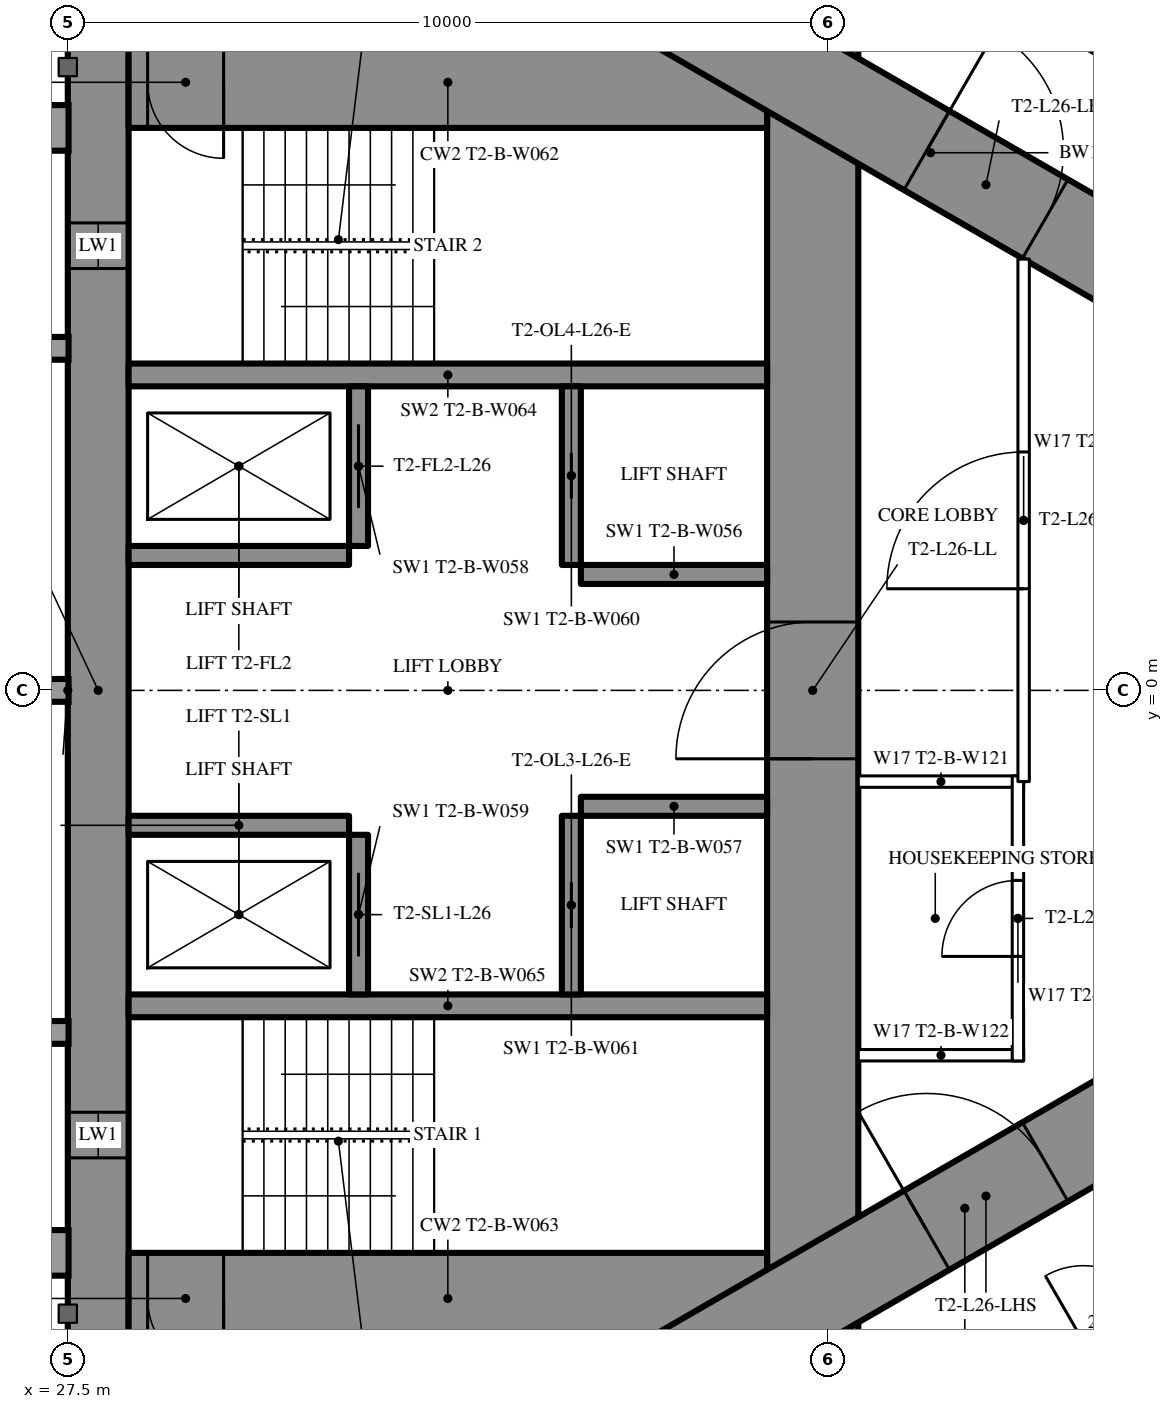
"""IFC4 building model, lengths in metres.
Left out: names, types, materials, properties, quantities, classifications, styles, units other than length and angle.
Written with IfcOpenShell. Run it as: python <this file> out.ifc"""

import sys

from ifc_helpers import new_model, si_unit, direction, frame, frame_2d, origin, place, context, subcontext, project, spatial, rectangle, extrude, element, fill, save


model = new_model("IFC4")
c1 = context("Model", 3, precision=1e-05, world=origin(), true_north=direction((0.0, 1.0)))
c2 = subcontext(c1, "Body", "Model", "MODEL_VIEW")
j1 = project(units=[si_unit("LENGTHUNIT", "METRE"), si_unit("PLANEANGLEUNIT", "RADIAN")], contexts=[c1])
p1 = place(None, origin())
s1 = spatial("IfcSite", under=j1, at=p1, CompositionType="ELEMENT")
p2 = place(p1, origin())
s2 = spatial("IfcBuilding", under=s1, at=p2, CompositionType="ELEMENT")
p3 = place(p2, frame((0.0, 0.0, 101.1)))
s3 = spatial("IfcBuildingStorey", under=s2, at=p3, CompositionType="ELEMENT", Elevation=101.1)
p4 = place(p3, frame((27.9, -8.6, 0.0), z_axis=(0.0, 0.0, 1.0), x_axis=(0.0, 1.0, 0.0)))
e1 = element("IfcWall", 1, at=p4, inside=s3, PredefinedType="SHEAR", context=c2, shape_type="SweptSolid", body=[
    extrude(rectangle(XDim=17.2, YDim=0.8, at=frame_2d((8.6, 0.0))), origin(), (0.0, 0.0, 1.0), 3.5),
])
p5 = place(p4, frame((2.45, 0.0, 0.6)))
e2 = element("IfcOpeningElement", 2, at=p5, cuts=e1, PredefinedType="OPENING", context=c2, shape_type="SweptSolid", body=[
    extrude(rectangle(XDim=0.6, YDim=2.1, at=frame_2d((0.3, 1.05))), frame((0.0, 0.41, 0.0), z_axis=(0.0, -1.0, 0.0), x_axis=(1.0, 0.0, 0.0)), (0.0, 0.0, 1.0), 0.82),
])
p6 = place(p4, frame((14.15, 0.0, 0.6)))
e3 = element("IfcOpeningElement", 3, at=p6, cuts=e1, PredefinedType="OPENING", context=c2, shape_type="SweptSolid", body=[
    extrude(rectangle(XDim=0.6, YDim=2.1, at=frame_2d((0.3, 1.05))), frame((0.0, 0.41, 0.0), z_axis=(0.0, -1.0, 0.0), x_axis=(1.0, 0.0, 0.0)), (0.0, 0.0, 1.0), 0.82),
])
p7 = place(p3, frame((37.3, -8.6, 0.0), z_axis=(0.0, 0.0, 1.0), x_axis=(0.0, 1.0, 0.0)))
e4 = element("IfcWall", 4, at=p7, inside=s3, PredefinedType="SHEAR", context=c2, shape_type="SweptSolid", body=[
    extrude(rectangle(XDim=17.2, YDim=1.2, at=frame_2d((8.6, 0.0))), origin(), (0.0, 0.0, 1.0), 3.5),
])
p8 = place(p7, frame((7.7, 0.0, 0.0)))
e5 = element("IfcOpeningElement", 5, at=p8, cuts=e4, PredefinedType="OPENING", context=c2, shape_type="SweptSolid", body=[
    extrude(rectangle(XDim=1.8, YDim=2.2, at=frame_2d((0.9, 1.1))), frame((0.0, 0.61, 0.0), z_axis=(0.0, -1.0, 0.0), x_axis=(1.0, 0.0, 0.0)), (0.0, 0.0, 1.0), 1.22),
])
p9 = place(p3, frame((28.3, -8.0, 0.0), z_axis=(0.0, 0.0, 1.0), x_axis=(1.0, 0.0, 0.0)))
e6 = element("IfcWall", 6, at=p9, inside=s3, PredefinedType="SHEAR", context=c2, shape_type="SweptSolid", body=[
    extrude(rectangle(XDim=8.4, YDim=1.2, at=frame_2d((4.2, 0.0))), origin(), (0.0, 0.0, 1.0), 3.5),
])
p10 = place(p9, frame((0.25, 0.0, 0.0)))
e7 = element("IfcOpeningElement", 7, at=p10, cuts=e6, PredefinedType="OPENING", context=c2, shape_type="SweptSolid", body=[
    extrude(rectangle(XDim=1.0, YDim=2.2, at=frame_2d((0.5, 1.1))), frame((0.0, 0.61, 0.0), z_axis=(0.0, -1.0, 0.0), x_axis=(1.0, 0.0, 0.0)), (0.0, 0.0, 1.0), 1.22),
])
p11 = place(p3, frame((28.3, 8.0, 0.0), z_axis=(0.0, 0.0, 1.0), x_axis=(1.0, 0.0, 0.0)))
e8 = element("IfcWall", 8, at=p11, inside=s3, PredefinedType="SHEAR", context=c2, shape_type="SweptSolid", body=[
    extrude(rectangle(XDim=8.4, YDim=1.2, at=frame_2d((4.2, 0.0))), origin(), (0.0, 0.0, 1.0), 3.5),
])
p12 = place(p11, frame((0.25, 0.0, 0.0)))
e9 = element("IfcOpeningElement", 9, at=p12, cuts=e8, PredefinedType="OPENING", context=c2, shape_type="SweptSolid", body=[
    extrude(rectangle(XDim=1.0, YDim=2.2, at=frame_2d((0.5, 1.1))), frame((0.0, 0.61, 0.0), z_axis=(0.0, -1.0, 0.0), x_axis=(1.0, 0.0, 0.0)), (0.0, 0.0, 1.0), 1.22),
])
for number, where, z_axis, x_axis in (
    (10, (28.3, -4.15, 0.0), (0.0, 0.0, 1.0), (1.0, 0.0, 0.0)),
    (11, (28.3, 4.15, 0.0), (0.0, 0.0, 1.0), (1.0, 0.0, 0.0)),
):
    element("IfcWall", number, at=place(p3, frame(where, z_axis=z_axis, x_axis=x_axis)), inside=s3, PredefinedType="SHEAR", context=c2, shape_type="SweptSolid", body=[
        extrude(rectangle(XDim=8.4, YDim=0.3, at=frame_2d((4.2, 0.0))), origin(), (0.0, 0.0, 1.0), 3.5),
    ])
p13 = place(p3, frame((31.325, -4.0, 0.0), z_axis=(0.0, 0.0, 1.0), x_axis=(0.0, 1.0, 0.0)))
e12 = element("IfcWall", 12, at=p13, inside=s3, PredefinedType="SHEAR", context=c2, shape_type="SweptSolid", body=[
    extrude(rectangle(XDim=2.1, YDim=0.25, at=frame_2d((1.05, 0.0))), origin(), (0.0, 0.0, 1.0), 3.5),
])
p14 = place(p13, frame((0.5, 0.0, 0.0)))
e13 = element("IfcOpeningElement", 13, at=p14, cuts=e12, PredefinedType="OPENING", context=c2, shape_type="SweptSolid", body=[
    extrude(rectangle(XDim=1.1, YDim=2.2, at=frame_2d((0.55, 1.1))), frame((0.0, 0.135, 0.0), z_axis=(0.0, -1.0, 0.0), x_axis=(1.0, 0.0, 0.0)), (0.0, 0.0, 1.0), 0.27),
])
p15 = place(p3, frame((34.125, -4.0, 0.0), z_axis=(0.0, 0.0, 1.0), x_axis=(0.0, 1.0, 0.0)))
e14 = element("IfcWall", 14, at=p15, inside=s3, PredefinedType="SHEAR", context=c2, shape_type="SweptSolid", body=[
    extrude(rectangle(XDim=2.35, YDim=0.25, at=frame_2d((1.175, 0.0))), origin(), (0.0, 0.0, 1.0), 3.5),
])
p16 = place(p15, frame((0.875, 0.0, 0.0)))
e15 = element("IfcOpeningElement", 15, at=p16, cuts=e14, PredefinedType="OPENING", context=c2, shape_type="SweptSolid", body=[
    extrude(rectangle(XDim=0.6, YDim=2.0, at=frame_2d((0.3, 1.0))), frame((0.0, 0.135, 0.0), z_axis=(0.0, -1.0, 0.0), x_axis=(1.0, 0.0, 0.0)), (0.0, 0.0, 1.0), 0.27),
])
p17 = place(p3, frame((28.3, -1.775, 0.0), z_axis=(0.0, 0.0, 1.0), x_axis=(1.0, 0.0, 0.0)))
e16 = element("IfcWall", 16, at=p17, inside=s3, PredefinedType="SHEAR", context=c2, shape_type="SweptSolid", body=[
    extrude(rectangle(XDim=2.9, YDim=0.25, at=frame_2d((1.45, 0.0))), origin(), (0.0, 0.0, 1.0), 3.5),
])
p18 = place(p3, frame((34.25, -1.525, 0.0), z_axis=(0.0, 0.0, 1.0), x_axis=(1.0, 0.0, 0.0)))
e17 = element("IfcWall", 17, at=p18, inside=s3, PredefinedType="SHEAR", context=c2, shape_type="SweptSolid", body=[
    extrude(rectangle(XDim=2.45, YDim=0.25, at=frame_2d((1.225, 0.0))), origin(), (0.0, 0.0, 1.0), 3.5),
])
p19 = place(p3, frame((31.325, 1.9, 0.0), z_axis=(0.0, 0.0, 1.0), x_axis=(0.0, 1.0, 0.0)))
e18 = element("IfcWall", 18, at=p19, inside=s3, PredefinedType="SHEAR", context=c2, shape_type="SweptSolid", body=[
    extrude(rectangle(XDim=2.1, YDim=0.25, at=frame_2d((1.05, 0.0))), origin(), (0.0, 0.0, 1.0), 3.5),
])
p20 = place(p19, frame((0.5, 0.0, 0.0)))
e19 = element("IfcOpeningElement", 19, at=p20, cuts=e18, PredefinedType="OPENING", context=c2, shape_type="SweptSolid", body=[
    extrude(rectangle(XDim=1.1, YDim=2.2, at=frame_2d((0.55, 1.1))), frame((0.0, 0.135, 0.0), z_axis=(0.0, -1.0, 0.0), x_axis=(1.0, 0.0, 0.0)), (0.0, 0.0, 1.0), 0.27),
])
p21 = place(p3, frame((34.125, 1.65, 0.0), z_axis=(0.0, 0.0, 1.0), x_axis=(0.0, 1.0, 0.0)))
e20 = element("IfcWall", 20, at=p21, inside=s3, PredefinedType="SHEAR", context=c2, shape_type="SweptSolid", body=[
    extrude(rectangle(XDim=2.35, YDim=0.25, at=frame_2d((1.175, 0.0))), origin(), (0.0, 0.0, 1.0), 3.5),
])
p22 = place(p21, frame((0.875, 0.0, 0.0)))
e21 = element("IfcOpeningElement", 21, at=p22, cuts=e20, PredefinedType="OPENING", context=c2, shape_type="SweptSolid", body=[
    extrude(rectangle(XDim=0.6, YDim=2.0, at=frame_2d((0.3, 1.0))), frame((0.0, 0.135, 0.0), z_axis=(0.0, -1.0, 0.0), x_axis=(1.0, 0.0, 0.0)), (0.0, 0.0, 1.0), 0.27),
])
p23 = place(p3, frame((28.3, 1.775, 0.0), z_axis=(0.0, 0.0, 1.0), x_axis=(1.0, 0.0, 0.0)))
e22 = element("IfcWall", 22, at=p23, inside=s3, PredefinedType="SHEAR", context=c2, shape_type="SweptSolid", body=[
    extrude(rectangle(XDim=2.9, YDim=0.25, at=frame_2d((1.45, 0.0))), origin(), (0.0, 0.0, 1.0), 3.5),
])
p24 = place(p3, frame((34.25, 1.525, 0.0), z_axis=(0.0, 0.0, 1.0), x_axis=(1.0, 0.0, 0.0)))
e23 = element("IfcWall", 23, at=p24, inside=s3, PredefinedType="SHEAR", context=c2, shape_type="SweptSolid", body=[
    extrude(rectangle(XDim=2.45, YDim=0.25, at=frame_2d((1.225, 0.0))), origin(), (0.0, 0.0, 1.0), 3.5),
])
p25 = place(p3, frame((27.2, -13.8, 0.0), z_axis=(0.0, 0.0, 1.0), x_axis=(0.866027159892, 0.499996958321, 0.0)))
e24 = element("IfcWall", 24, at=p25, inside=s3, PredefinedType="SHEAR", context=c2, shape_type="SweptSolid", body=[
    extrude(rectangle(XDim=27.947, YDim=1.2, at=frame_2d((13.973, 0.0))), origin(), (0.0, 0.0, 1.0), 3.5),
])
p26 = place(p25, frame((4.6, 0.0, 0.0)))
e25 = element("IfcOpeningElement", 25, at=p26, cuts=e24, PredefinedType="OPENING", context=c2, shape_type="SweptSolid", body=[
    extrude(rectangle(XDim=1.0, YDim=2.2, at=frame_2d((0.5, 1.1))), frame((0.0, 0.61, 0.0), z_axis=(0.0, -1.0, 0.0), x_axis=(1.0, 0.0, 0.0)), (0.0, 0.0, 1.0), 1.22),
])
p27 = place(p25, frame((13.395, 0.0, 0.0)))
e26 = element("IfcOpeningElement", 26, at=p27, cuts=e24, PredefinedType="OPENING", context=c2, shape_type="SweptSolid", body=[
    extrude(rectangle(XDim=1.8, YDim=2.2, at=frame_2d((0.9, 1.1))), frame((0.0, 0.61, 0.0), z_axis=(0.0, -1.0, 0.0), x_axis=(1.0, 0.0, 0.0)), (0.0, 0.0, 1.0), 1.22),
])
p28 = place(p3, frame((27.2, 13.8, 0.0), z_axis=(0.0, 0.0, 1.0), x_axis=(0.866024515034, -0.500001539357, 0.0)))
e27 = element("IfcWall", 27, at=p28, inside=s3, PredefinedType="SHEAR", context=c2, shape_type="SweptSolid", body=[
    extrude(rectangle(XDim=26.907, YDim=1.2, at=frame_2d((13.454, 0.0))), origin(), (0.0, 0.0, 1.0), 3.5),
])
p29 = place(p28, frame((4.6, 0.0, 0.0)))
e28 = element("IfcOpeningElement", 28, at=p29, cuts=e27, PredefinedType="OPENING", context=c2, shape_type="SweptSolid", body=[
    extrude(rectangle(XDim=1.0, YDim=2.2, at=frame_2d((0.5, 1.1))), frame((0.0, 0.61, 0.0), z_axis=(0.0, -1.0, 0.0), x_axis=(1.0, 0.0, 0.0)), (0.0, 0.0, 1.0), 1.22),
])
p30 = place(p28, frame((13.395, 0.0, 0.0)))
e29 = element("IfcOpeningElement", 29, at=p30, cuts=e27, PredefinedType="OPENING", context=c2, shape_type="SweptSolid", body=[
    extrude(rectangle(XDim=1.8, YDim=2.2, at=frame_2d((0.9, 1.1))), frame((0.0, 0.61, 0.0), z_axis=(0.0, -1.0, 0.0), x_axis=(1.0, 0.0, 0.0)), (0.0, 0.0, 1.0), 1.22),
])
p31 = place(p3, frame((36.834, 10.894, 0.0), z_axis=(0.0, 0.0, 1.0), x_axis=(0.866028157229, -0.499995230863, 0.0)))
e30 = element("IfcWall", 30, at=p31, inside=s3, PredefinedType="PARTITIONING", context=c2, shape_type="SweptSolid", body=[
    extrude(rectangle(XDim=21.667, YDim=0.2, at=frame_2d((10.833, 0.0))), origin(), (0.0, 0.0, 1.0), 3.25),
])
p32 = place(p31, frame((20.117, 0.0, 0.0)))
e31 = element("IfcOpeningElement", 31, at=p32, cuts=e30, PredefinedType="OPENING", context=c2, shape_type="SweptSolid", body=[
    extrude(rectangle(XDim=0.95, YDim=2.2, at=frame_2d((0.475, 1.1))), frame((0.0, 0.11, 0.0), z_axis=(0.0, -1.0, 0.0), x_axis=(1.0, 0.0, 0.0)), (0.0, 0.0, 1.0), 0.22),
])
p33 = place(p31, frame((14.335, 0.0, 0.0)))
e32 = element("IfcOpeningElement", 32, at=p33, cuts=e30, PredefinedType="OPENING", context=c2, shape_type="SweptSolid", body=[
    extrude(rectangle(XDim=0.95, YDim=2.2, at=frame_2d((0.475, 1.1))), frame((0.0, 0.11, 0.0), z_axis=(0.0, -1.0, 0.0), x_axis=(1.0, 0.0, 0.0)), (0.0, 0.0, 1.0), 0.22),
])
p34 = place(p31, frame((9.693, 0.0, 0.0)))
e33 = element("IfcOpeningElement", 33, at=p34, cuts=e30, PredefinedType="OPENING", context=c2, shape_type="SweptSolid", body=[
    extrude(rectangle(XDim=0.95, YDim=2.2, at=frame_2d((0.475, 1.1))), frame((0.0, 0.11, 0.0), z_axis=(0.0, -1.0, 0.0), x_axis=(1.0, 0.0, 0.0)), (0.0, 0.0, 1.0), 0.22),
])
p35 = place(p31, frame((2.95, 0.0, 0.0)))
e34 = element("IfcOpeningElement", 34, at=p35, cuts=e30, PredefinedType="OPENING", context=c2, shape_type="SweptSolid", body=[
    extrude(rectangle(XDim=0.95, YDim=2.2, at=frame_2d((0.475, 1.1))), frame((0.0, 0.11, 0.0), z_axis=(0.0, -1.0, 0.0), x_axis=(1.0, 0.0, 0.0)), (0.0, 0.0, 1.0), 0.22),
])
p36 = place(p3, frame((37.96, -10.243, 0.0), z_axis=(0.0, 0.0, 1.0), x_axis=(0.86603350054, 0.499985975746, 0.0)))
e35 = element("IfcWall", 35, at=p36, inside=s3, PredefinedType="PARTITIONING", context=c2, shape_type="SweptSolid", body=[
    extrude(rectangle(XDim=7.993, YDim=0.2, at=frame_2d((3.997, 0.0))), origin(), (0.0, 0.0, 1.0), 3.25),
])
p37 = place(p36, frame((3.35, 0.0, 0.0)))
e36 = element("IfcOpeningElement", 36, at=p37, cuts=e35, PredefinedType="OPENING", context=c2, shape_type="SweptSolid", body=[
    extrude(rectangle(XDim=1.0, YDim=2.2, at=frame_2d((0.5, 1.1))), frame((0.0, 0.11, 0.0), z_axis=(0.0, -1.0, 0.0), x_axis=(1.0, 0.0, 0.0)), (0.0, 0.0, 1.0), 0.22),
])
for number, where, z_axis, x_axis in (
    (37, (37.9, -1.2, 0.0), (0.0, 0.0, 1.0), (1.0, 0.0, 0.0)),
    (38, (37.9, -4.8, 0.0), (0.0, 0.0, 1.0), (1.0, 0.0, 0.0)),
):
    element("IfcWall", number, at=place(p3, frame(where, z_axis=z_axis, x_axis=x_axis)), inside=s3, PredefinedType="PARTITIONING", context=c2, shape_type="SweptSolid", body=[
        extrude(rectangle(XDim=2.175, YDim=0.15, at=frame_2d((1.087, 0.0))), origin(), (0.0, 0.0, 1.0), 3.25),
    ])
p38 = place(p3, frame((40.0, -4.875, 0.0), z_axis=(0.0, 0.0, 1.0), x_axis=(0.0, 1.0, 0.0)))
e39 = element("IfcWall", 39, at=p38, inside=s3, PredefinedType="PARTITIONING", context=c2, shape_type="SweptSolid", body=[
    extrude(rectangle(XDim=3.75, YDim=0.15, at=frame_2d((1.875, 0.0))), origin(), (0.0, 0.0, 1.0), 3.25),
])
p39 = place(p38, frame((1.375, 0.0, 0.0)))
e40 = element("IfcOpeningElement", 40, at=p39, cuts=e39, PredefinedType="OPENING", context=c2, shape_type="SweptSolid", body=[
    extrude(rectangle(XDim=1.0, YDim=2.2, at=frame_2d((0.5, 1.1))), frame((0.0, 0.085, 0.0), z_axis=(0.0, -1.0, 0.0), x_axis=(1.0, 0.0, 0.0)), (0.0, 0.0, 1.0), 0.17),
])
p40 = place(p3, frame((40.075, -1.2, 0.0), z_axis=(0.0, 0.0, 1.0), x_axis=(0.0, 1.0, 0.0)))
e41 = element("IfcWall", 41, at=p40, inside=s3, PredefinedType="PARTITIONING", context=c2, shape_type="SweptSolid", body=[
    extrude(rectangle(XDim=6.874, YDim=0.15, at=frame_2d((3.437, 0.0))), origin(), (0.0, 0.0, 1.0), 3.25),
])
p41 = place(p40, frame((2.537, 0.0, 0.0)))
e42 = element("IfcOpeningElement", 42, at=p41, cuts=e41, PredefinedType="OPENING", context=c2, shape_type="SweptSolid", body=[
    extrude(rectangle(XDim=1.8, YDim=2.2, at=frame_2d((0.9, 1.1))), frame((0.0, 0.085, 0.0), z_axis=(0.0, -1.0, 0.0), x_axis=(1.0, 0.0, 0.0)), (0.0, 0.0, 1.0), 0.17),
])
p42 = place(p37, origin())
e43 = element("IfcDoor", 43, at=p42, inside=s3, OperationType="SINGLE_SWING_LEFT", PredefinedType="DOOR", context=c2, shape_type="SweptSolid", body=[
    extrude(rectangle(XDim=1.0, YDim=2.2, at=frame_2d((0.5, 1.1))), frame((0.0, 0.025, 0.0), z_axis=(0.0, -1.0, 0.0), x_axis=(1.0, 0.0, 0.0)), (0.0, 0.0, 1.0), 0.05),
])
fill(e36, e43)
p43 = place(p39, origin())
e44 = element("IfcDoor", 44, at=p43, inside=s3, OperationType="SINGLE_SWING_LEFT", PredefinedType="DOOR", context=c2, shape_type="SweptSolid", body=[
    extrude(rectangle(XDim=1.0, YDim=2.2, at=frame_2d((0.5, 1.1))), frame((0.0, 0.025, 0.0), z_axis=(0.0, -1.0, 0.0), x_axis=(1.0, 0.0, 0.0)), (0.0, 0.0, 1.0), 0.05),
])
fill(e40, e44)
p44 = place(p41, origin())
e45 = element("IfcDoor", 45, at=p44, inside=s3, OperationType="DOUBLE_DOOR_SINGLE_SWING", PredefinedType="DOOR", context=c2, shape_type="SweptSolid", body=[
    extrude(rectangle(XDim=1.8, YDim=2.2, at=frame_2d((0.9, 1.1))), frame((0.0, 0.025, 0.0), z_axis=(0.0, -1.0, 0.0), x_axis=(1.0, 0.0, 0.0)), (0.0, 0.0, 1.0), 0.05),
])
fill(e42, e45)
p45 = place(p27, origin())
e46 = element("IfcDoor", 46, at=p45, inside=s3, OperationType="DOUBLE_DOOR_SINGLE_SWING", PredefinedType="DOOR", context=c2, shape_type="SweptSolid", body=[
    extrude(rectangle(XDim=1.8, YDim=2.2, at=frame_2d((0.9, 1.1))), frame((0.0, 0.025, 0.0), z_axis=(0.0, -1.0, 0.0), x_axis=(1.0, 0.0, 0.0)), (0.0, 0.0, 1.0), 0.05),
])
fill(e26, e46)
p46 = place(p30, origin())
e47 = element("IfcDoor", 47, at=p46, inside=s3, OperationType="DOUBLE_DOOR_SINGLE_SWING", PredefinedType="DOOR", context=c2, shape_type="SweptSolid", body=[
    extrude(rectangle(XDim=1.8, YDim=2.2, at=frame_2d((0.9, 1.1))), frame((0.0, 0.025, 0.0), z_axis=(0.0, -1.0, 0.0), x_axis=(1.0, 0.0, 0.0)), (0.0, 0.0, 1.0), 0.05),
])
fill(e29, e47)
p47 = place(p8, origin())
e48 = element("IfcDoor", 48, at=p47, inside=s3, OperationType="DOUBLE_DOOR_SINGLE_SWING", PredefinedType="DOOR", context=c2, shape_type="SweptSolid", body=[
    extrude(rectangle(XDim=1.8, YDim=2.2, at=frame_2d((0.9, 1.1))), frame((0.0, 0.025, 0.0), z_axis=(0.0, -1.0, 0.0), x_axis=(1.0, 0.0, 0.0)), (0.0, 0.0, 1.0), 0.05),
])
fill(e5, e48)
p48 = place(p10, origin())
e49 = element("IfcDoor", 49, at=p48, inside=s3, OperationType="SINGLE_SWING_RIGHT", PredefinedType="DOOR", context=c2, shape_type="SweptSolid", body=[
    extrude(rectangle(XDim=1.0, YDim=2.2, at=frame_2d((0.5, 1.1))), frame((0.0, 0.025, 0.0), z_axis=(0.0, -1.0, 0.0), x_axis=(1.0, 0.0, 0.0)), (0.0, 0.0, 1.0), 0.05),
])
fill(e7, e49)
p49 = place(p12, origin())
e50 = element("IfcDoor", 50, at=p49, inside=s3, OperationType="SINGLE_SWING_RIGHT", PredefinedType="DOOR", context=c2, shape_type="SweptSolid", body=[
    extrude(rectangle(XDim=1.0, YDim=2.2, at=frame_2d((0.5, 1.1))), frame((0.0, 0.025, 0.0), z_axis=(0.0, -1.0, 0.0), x_axis=(1.0, 0.0, 0.0)), (0.0, 0.0, 1.0), 0.05),
])
fill(e9, e50)
p50 = place(p14, origin())
e51 = element("IfcDoor", 51, at=p50, inside=s3, OperationType="SLIDING_TO_LEFT", PredefinedType="USERDEFINED", context=c2, shape_type="SweptSolid", body=[
    extrude(rectangle(XDim=1.1, YDim=2.2, at=frame_2d((0.55, 1.1))), frame((0.0, 0.025, 0.0), z_axis=(0.0, -1.0, 0.0), x_axis=(1.0, 0.0, 0.0)), (0.0, 0.0, 1.0), 0.05),
])
fill(e13, e51)
p51 = place(p20, origin())
e52 = element("IfcDoor", 52, at=p51, inside=s3, OperationType="SLIDING_TO_LEFT", PredefinedType="USERDEFINED", context=c2, shape_type="SweptSolid", body=[
    extrude(rectangle(XDim=1.1, YDim=2.2, at=frame_2d((0.55, 1.1))), frame((0.0, 0.025, 0.0), z_axis=(0.0, -1.0, 0.0), x_axis=(1.0, 0.0, 0.0)), (0.0, 0.0, 1.0), 0.05),
])
fill(e19, e52)
p52 = place(p16, origin())
e53 = element("IfcDoor", 53, at=p52, inside=s3, OperationType="SLIDING_TO_LEFT", PredefinedType="DOOR", context=c2, shape_type="SweptSolid", body=[
    extrude(rectangle(XDim=0.6, YDim=2.0, at=frame_2d((0.3, 1.0))), frame((0.0, 0.025, 0.0), z_axis=(0.0, -1.0, 0.0), x_axis=(1.0, 0.0, 0.0)), (0.0, 0.0, 1.0), 0.05),
])
fill(e15, e53)
p53 = place(p22, origin())
e54 = element("IfcDoor", 54, at=p53, inside=s3, OperationType="SLIDING_TO_LEFT", PredefinedType="DOOR", context=c2, shape_type="SweptSolid", body=[
    extrude(rectangle(XDim=0.6, YDim=2.0, at=frame_2d((0.3, 1.0))), frame((0.0, 0.025, 0.0), z_axis=(0.0, -1.0, 0.0), x_axis=(1.0, 0.0, 0.0)), (0.0, 0.0, 1.0), 0.05),
])
fill(e21, e54)
p54 = place(p5, origin())
e55 = element("IfcWindow", 55, at=p54, inside=s3, PartitioningType="SINGLE_PANEL", PredefinedType="WINDOW", context=c2, shape_type="SweptSolid", body=[
    extrude(rectangle(XDim=0.6, YDim=2.1, at=frame_2d((0.3, 1.05))), frame((0.0, 0.03, 0.0), z_axis=(0.0, -1.0, 0.0), x_axis=(1.0, 0.0, 0.0)), (0.0, 0.0, 1.0), 0.06),
])
fill(e2, e55)
p55 = place(p6, origin())
e56 = element("IfcWindow", 56, at=p55, inside=s3, PartitioningType="SINGLE_PANEL", PredefinedType="WINDOW", context=c2, shape_type="SweptSolid", body=[
    extrude(rectangle(XDim=0.6, YDim=2.1, at=frame_2d((0.3, 1.05))), frame((0.0, 0.03, 0.0), z_axis=(0.0, -1.0, 0.0), x_axis=(1.0, 0.0, 0.0)), (0.0, 0.0, 1.0), 0.06),
])
fill(e3, e56)
save(model, sys.argv[1])
